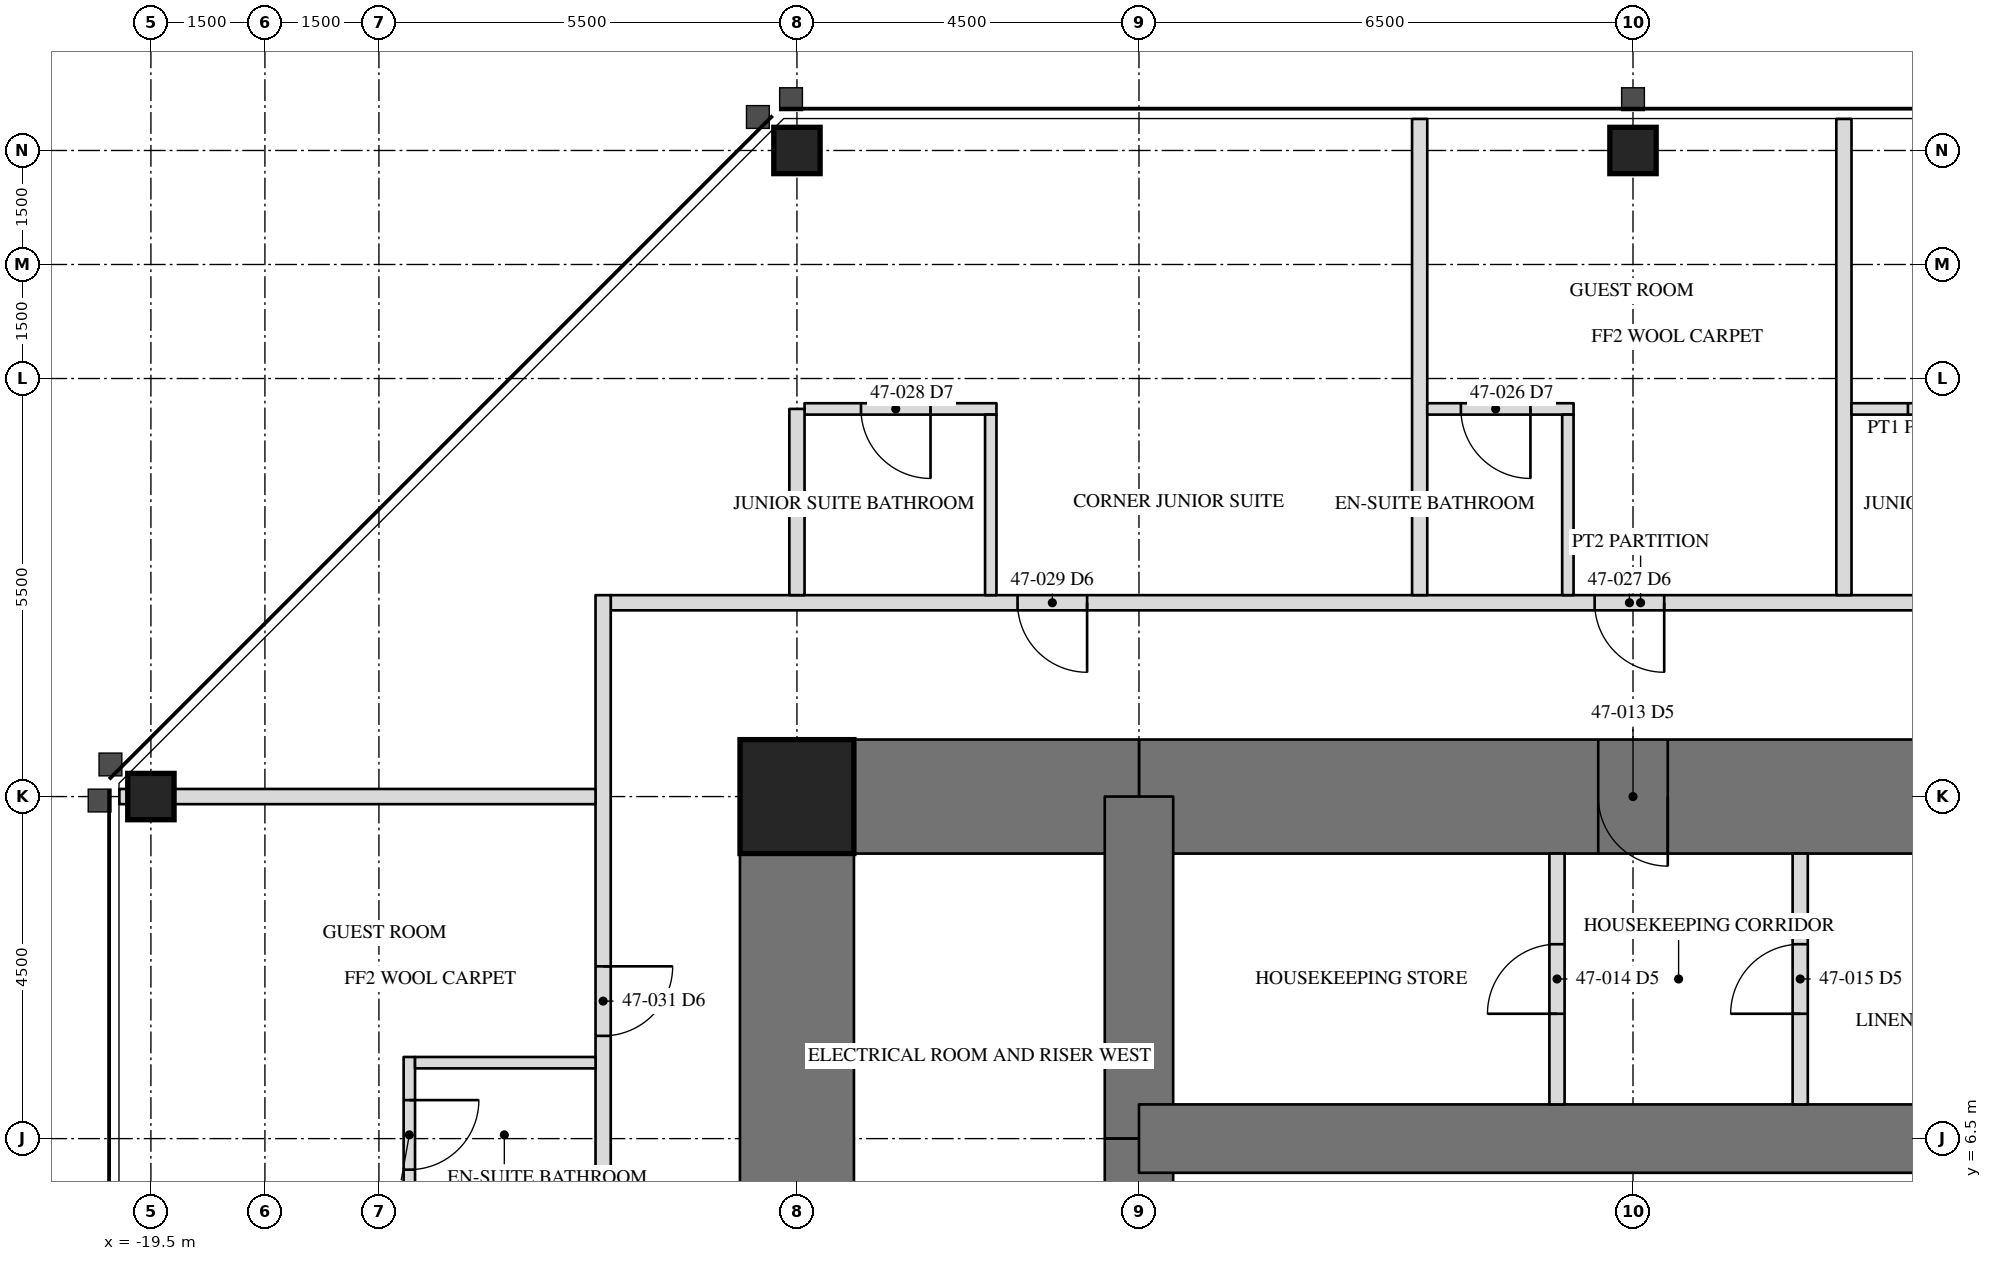
"""IFC4 building model, lengths in metres.
Left out: names, types, materials, properties, quantities, classifications, styles, units other than length and angle.
Written with IfcOpenShell. Run it as: python <this file> out.ifc"""

import sys

from ifc_helpers import new_model, si_unit, direction, frame, frame_2d, origin, origin_2d, place, context, subcontext, project, spatial, rectangle, hollow_rectangle, extrude, element, fill, save


model = new_model("IFC4")
c1 = context("Model", 3, precision=1e-05, world=origin(), true_north=direction((0.0, 1.0)))
c2 = subcontext(c1, "Body", "Model", "MODEL_VIEW")
j1 = project(units=[si_unit("LENGTHUNIT", "METRE"), si_unit("PLANEANGLEUNIT", "RADIAN")], contexts=[c1])
p1 = place(None, origin())
s1 = spatial("IfcSite", under=j1, at=p1, CompositionType="ELEMENT")
p2 = place(p1, origin())
s2 = spatial("IfcBuilding", under=s1, at=p2, CompositionType="ELEMENT")
p3 = place(p2, frame((0.0, 0.0, 201.2)))
s3 = spatial("IfcBuildingStorey", under=s2, at=p3, CompositionType="ELEMENT", Elevation=201.2)
for number, where, z_axis, x_axis in (
    (1, (0.0, 19.5, 0.0), (0.0, 0.0, 1.0), (1.0, 0.0, 0.0)),
    (2, (-11.0, 19.5, 0.0), (0.0, 0.0, 1.0), (1.0, 0.0, 0.0)),
    (3, (-19.5, 11.0, 0.0), (0.0, 0.0, 1.0), (0.0, 1.0, 0.0)),
):
    element("IfcColumn", number, at=place(p3, frame(where, z_axis=z_axis, x_axis=x_axis)), inside=s3, PredefinedType="COLUMN", context=c2, shape_type="SweptSolid", body=[
        extrude(hollow_rectangle(XDim=0.61, YDim=0.61, WallThickness=0.076, at=origin_2d()), origin(), (0.0, 0.0, 1.0), 3.5),
    ])
p4 = place(p3, frame((-11.0, 11.0, 0.0), z_axis=(0.0, 0.0, 1.0), x_axis=(0.0, -1.0, 0.0)))
e4 = element("IfcWall", 4, at=p4, inside=s3, PredefinedType="SHEAR", context=c2, shape_type="SweptSolid", body=[
    extrude(rectangle(XDim=22.0, YDim=1.5, at=frame_2d((11.0, 0.0))), origin(), (0.0, 0.0, 1.0), 3.5),
])
p5 = place(p4, frame((15.393, 0.0, 0.0)))
e5 = element("IfcOpeningElement", 5, at=p5, cuts=e4, PredefinedType="OPENING", context=c2, shape_type="SweptSolid", body=[
    extrude(rectangle(XDim=0.915, YDim=2.134, at=frame_2d((0.458, 1.067))), frame((0.0, 0.76, 0.0), z_axis=(0.0, -1.0, 0.0), x_axis=(1.0, 0.0, 0.0)), (0.0, 0.0, 1.0), 1.52),
])
p6 = place(p3, frame((6.5, 11.0, 0.0), z_axis=(0.0, 0.0, 1.0), x_axis=(-1.0, 0.0, 0.0)))
e6 = element("IfcWall", 6, at=p6, inside=s3, PredefinedType="SHEAR", context=c2, shape_type="SweptSolid", body=[
    extrude(rectangle(XDim=13.0, YDim=1.5, at=frame_2d((6.5, 0.0))), origin(), (0.0, 0.0, 1.0), 3.5),
])
p7 = place(p6, frame((6.042, 0.0, 0.0)))
e7 = element("IfcOpeningElement", 7, at=p7, cuts=e6, PredefinedType="OPENING", context=c2, shape_type="SweptSolid", body=[
    extrude(rectangle(XDim=0.915, YDim=2.134, at=frame_2d((0.458, 1.067))), frame((0.0, 0.76, 0.0), z_axis=(0.0, -1.0, 0.0), x_axis=(1.0, 0.0, 0.0)), (0.0, 0.0, 1.0), 1.52),
])
p8 = place(p3, frame((-6.5, 11.0, 0.0), z_axis=(0.0, 0.0, 1.0), x_axis=(-1.0, 0.0, 0.0)))
e8 = element("IfcWall", 8, at=p8, inside=s3, PredefinedType="SHEAR", context=c2, shape_type="SweptSolid", body=[
    extrude(rectangle(XDim=4.5, YDim=1.5, at=frame_2d((2.25, 0.0))), origin(), (0.0, 0.0, 1.0), 3.5),
])
p9 = place(p3, frame((-6.5, 11.0, 0.0), z_axis=(0.0, 0.0, 1.0), x_axis=(0.0, -1.0, 0.0)))
e9 = element("IfcWall", 9, at=p9, inside=s3, PredefinedType="SHEAR", context=c2, shape_type="SweptSolid", body=[
    extrude(rectangle(XDim=4.5, YDim=0.9, at=frame_2d((2.25, 0.0))), origin(), (0.0, 0.0, 1.0), 3.5),
])
p10 = place(p3, frame((-6.5, 6.5, 0.0), z_axis=(0.0, 0.0, 1.0), x_axis=(0.0, -1.0, 0.0)))
e10 = element("IfcWall", 10, at=p10, inside=s3, PredefinedType="SHEAR", context=c2, shape_type="SweptSolid", body=[
    extrude(rectangle(XDim=13.0, YDim=0.9, at=frame_2d((6.5, 0.0))), origin(), (0.0, 0.0, 1.0), 3.5),
])
p11 = place(p10, frame((10.893, 0.0, 0.0)))
e11 = element("IfcOpeningElement", 11, at=p11, cuts=e10, PredefinedType="OPENING", context=c2, shape_type="SweptSolid", body=[
    extrude(rectangle(XDim=0.915, YDim=2.134, at=frame_2d((0.458, 1.067))), frame((0.0, 0.46, 0.0), z_axis=(0.0, -1.0, 0.0), x_axis=(1.0, 0.0, 0.0)), (0.0, 0.0, 1.0), 0.92),
])
p12 = place(p10, frame((0.61, 0.0, 0.0)))
e12 = element("IfcOpeningElement", 12, at=p12, cuts=e10, PredefinedType="OPENING", context=c2, shape_type="SweptSolid", body=[
    extrude(rectangle(XDim=0.915, YDim=2.134, at=frame_2d((0.458, 1.067))), frame((0.0, 0.46, 0.0), z_axis=(0.0, -1.0, 0.0), x_axis=(1.0, 0.0, 0.0)), (0.0, 0.0, 1.0), 0.92),
])
p13 = place(p3, frame((6.5, 6.5, 0.0), z_axis=(0.0, 0.0, 1.0), x_axis=(-1.0, 0.0, 0.0)))
e13 = element("IfcWall", 13, at=p13, inside=s3, PredefinedType="SHEAR", context=c2, shape_type="SweptSolid", body=[
    extrude(rectangle(XDim=13.0, YDim=0.9, at=frame_2d((6.5, 0.0))), origin(), (0.0, 0.0, 1.0), 3.5),
])
p14 = place(p3, frame((-11.0, 11.0, 0.0), z_axis=(0.0, 0.0, 1.0), x_axis=(1.0, 0.0, 0.0)))
e14 = element("IfcColumn", 14, at=p14, inside=s3, PredefinedType="COLUMN", context=c2, shape_type="SweptSolid", body=[
    extrude(hollow_rectangle(XDim=1.499, YDim=1.499, WallThickness=0.102, at=origin_2d()), origin(), (0.0, 0.0, 1.0), 3.5),
])
p15 = place(p3, frame((-1.0, 6.95, 0.0), z_axis=(0.0, 0.0, 1.0), x_axis=(0.0, 1.0, 0.0)))
e15 = element("IfcWall", 15, at=p15, inside=s3, PredefinedType="PARTITIONING", context=c2, shape_type="SweptSolid", body=[
    extrude(rectangle(XDim=3.3, YDim=0.2, at=frame_2d((1.65, 0.0))), origin(), (0.0, 0.0, 1.0), 3.31),
])
p16 = place(p15, frame((1.192, 0.0, 0.0)))
e16 = element("IfcOpeningElement", 16, at=p16, cuts=e15, PredefinedType="OPENING", context=c2, shape_type="SweptSolid", body=[
    extrude(rectangle(XDim=0.915, YDim=2.134, at=frame_2d((0.458, 1.067))), frame((0.0, 0.11, 0.0), z_axis=(0.0, -1.0, 0.0), x_axis=(1.0, 0.0, 0.0)), (0.0, 0.0, 1.0), 0.22),
])
p17 = place(p3, frame((2.2, 6.95, 0.0), z_axis=(0.0, 0.0, 1.0), x_axis=(0.0, 1.0, 0.0)))
e17 = element("IfcWall", 17, at=p17, inside=s3, PredefinedType="PARTITIONING", context=c2, shape_type="SweptSolid", body=[
    extrude(rectangle(XDim=3.3, YDim=0.2, at=frame_2d((1.65, 0.0))), origin(), (0.0, 0.0, 1.0), 3.31),
])
p18 = place(p17, frame((1.192, 0.0, 0.0)))
e18 = element("IfcOpeningElement", 18, at=p18, cuts=e17, PredefinedType="OPENING", context=c2, shape_type="SweptSolid", body=[
    extrude(rectangle(XDim=0.915, YDim=2.134, at=frame_2d((0.458, 1.067))), frame((0.0, 0.11, 0.0), z_axis=(0.0, -1.0, 0.0), x_axis=(1.0, 0.0, 0.0)), (0.0, 0.0, 1.0), 0.22),
])
p19 = place(p3, frame((13.65, 13.55, 0.0), z_axis=(0.0, 0.0, 1.0), x_axis=(-1.0, 0.0, 0.0)))
e19 = element("IfcWall", 19, at=p19, inside=s3, PredefinedType="PARTITIONING", context=c2, shape_type="SweptSolid", body=[
    extrude(rectangle(XDim=27.1, YDim=0.2, at=frame_2d((13.55, 0.0))), origin(), (0.0, 0.0, 1.0), 3.31),
])
p20 = place(p19, frame((7.058, 0.0, 0.0)))
e20 = element("IfcOpeningElement", 20, at=p20, cuts=e19, PredefinedType="OPENING", context=c2, shape_type="SweptSolid", body=[
    extrude(rectangle(XDim=0.915, YDim=2.134, at=frame_2d((0.458, 1.067))), frame((0.0, 0.11, 0.0), z_axis=(0.0, -1.0, 0.0), x_axis=(1.0, 0.0, 0.0)), (0.0, 0.0, 1.0), 0.22),
])
p21 = place(p19, frame((13.24, 0.0, 0.0)))
e21 = element("IfcOpeningElement", 21, at=p21, cuts=e19, PredefinedType="OPENING", context=c2, shape_type="SweptSolid", body=[
    extrude(rectangle(XDim=0.915, YDim=2.134, at=frame_2d((0.458, 1.067))), frame((0.0, 0.11, 0.0), z_axis=(0.0, -1.0, 0.0), x_axis=(1.0, 0.0, 0.0)), (0.0, 0.0, 1.0), 0.22),
])
p22 = place(p19, frame((20.833, 0.0, 0.0)))
e22 = element("IfcOpeningElement", 22, at=p22, cuts=e19, PredefinedType="OPENING", context=c2, shape_type="SweptSolid", body=[
    extrude(rectangle(XDim=0.915, YDim=2.134, at=frame_2d((0.458, 1.067))), frame((0.0, 0.11, 0.0), z_axis=(0.0, -1.0, 0.0), x_axis=(1.0, 0.0, 0.0)), (0.0, 0.0, 1.0), 0.22),
])
p23 = place(p3, frame((-13.55, 13.65, 0.0), z_axis=(0.0, 0.0, 1.0), x_axis=(0.0, -1.0, 0.0)))
e23 = element("IfcWall", 23, at=p23, inside=s3, PredefinedType="PARTITIONING", context=c2, shape_type="SweptSolid", body=[
    extrude(rectangle(XDim=27.1, YDim=0.2, at=frame_2d((13.55, 0.0))), origin(), (0.0, 0.0, 1.0), 3.31),
])
p24 = place(p23, frame((4.884, 0.0, 0.0)))
e24 = element("IfcOpeningElement", 24, at=p24, cuts=e23, PredefinedType="OPENING", context=c2, shape_type="SweptSolid", body=[
    extrude(rectangle(XDim=0.915, YDim=2.134, at=frame_2d((0.458, 1.067))), frame((0.0, 0.11, 0.0), z_axis=(0.0, -1.0, 0.0), x_axis=(1.0, 0.0, 0.0)), (0.0, 0.0, 1.0), 0.22),
])
p25 = place(p23, frame((10.433, 0.0, 0.0)))
e25 = element("IfcOpeningElement", 25, at=p25, cuts=e23, PredefinedType="OPENING", context=c2, shape_type="SweptSolid", body=[
    extrude(rectangle(XDim=0.915, YDim=2.134, at=frame_2d((0.458, 1.067))), frame((0.0, 0.11, 0.0), z_axis=(0.0, -1.0, 0.0), x_axis=(1.0, 0.0, 0.0)), (0.0, 0.0, 1.0), 0.22),
])
p26 = place(p23, frame((16.046, 0.0, 0.0)))
e26 = element("IfcOpeningElement", 26, at=p26, cuts=e23, PredefinedType="OPENING", context=c2, shape_type="SweptSolid", body=[
    extrude(rectangle(XDim=0.915, YDim=2.134, at=frame_2d((0.458, 1.067))), frame((0.0, 0.11, 0.0), z_axis=(0.0, -1.0, 0.0), x_axis=(1.0, 0.0, 0.0)), (0.0, 0.0, 1.0), 0.22),
])
p27 = place(p23, frame((21.433, 0.0, 0.0)))
e27 = element("IfcOpeningElement", 27, at=p27, cuts=e23, PredefinedType="OPENING", context=c2, shape_type="SweptSolid", body=[
    extrude(rectangle(XDim=0.915, YDim=2.134, at=frame_2d((0.458, 1.067))), frame((0.0, 0.11, 0.0), z_axis=(0.0, -1.0, 0.0), x_axis=(1.0, 0.0, 0.0)), (0.0, 0.0, 1.0), 0.22),
])
for number, where, z_axis, x_axis in (
    (28, (2.775, 13.65, 0.0), (0.0, 0.0, 1.0), (0.0, 1.0, 0.0)),
    (29, (-2.807, 13.65, 0.0), (0.0, 0.0, 1.0), (0.0, 1.0, 0.0)),
):
    element("IfcWall", number, at=place(p3, frame(where, z_axis=z_axis, x_axis=x_axis)), inside=s3, PredefinedType="PARTITIONING", context=c2, shape_type="SweptSolid", body=[
        extrude(rectangle(XDim=6.265, YDim=0.2, at=frame_2d((3.133, 0.0))), origin(), (0.0, 0.0, 1.0), 3.31),
    ])
p28 = place(p3, frame((5.4, 16.1, 0.0), z_axis=(0.0, 0.0, 1.0), x_axis=(-1.0, 0.0, 0.0)))
e30 = element("IfcWall", 30, at=p28, inside=s3, PredefinedType="PARTITIONING", context=c2, shape_type="SweptSolid", body=[
    extrude(rectangle(XDim=2.525, YDim=0.15, at=frame_2d((1.262, 0.0))), origin(), (0.0, 0.0, 1.0), 3.31),
])
p29 = place(p28, frame((0.867, 0.0, 0.0)))
e31 = element("IfcOpeningElement", 31, at=p29, cuts=e30, PredefinedType="OPENING", context=c2, shape_type="SweptSolid", body=[
    extrude(rectangle(XDim=0.915, YDim=2.032, at=frame_2d((0.458, 1.016))), frame((0.0, 0.085, 0.0), z_axis=(0.0, -1.0, 0.0), x_axis=(1.0, 0.0, 0.0)), (0.0, 0.0, 1.0), 0.17),
])
p30 = place(p3, frame((-0.782, 16.1, 0.0), z_axis=(0.0, 0.0, 1.0), x_axis=(-1.0, 0.0, 0.0)))
e32 = element("IfcWall", 32, at=p30, inside=s3, PredefinedType="PARTITIONING", context=c2, shape_type="SweptSolid", body=[
    extrude(rectangle(XDim=1.925, YDim=0.15, at=frame_2d((0.962, 0.0))), origin(), (0.0, 0.0, 1.0), 3.31),
])
p31 = place(p30, frame((0.567, 0.0, 0.0)))
e33 = element("IfcOpeningElement", 33, at=p31, cuts=e32, PredefinedType="OPENING", context=c2, shape_type="SweptSolid", body=[
    extrude(rectangle(XDim=0.915, YDim=2.032, at=frame_2d((0.458, 1.016))), frame((0.0, 0.085, 0.0), z_axis=(0.0, -1.0, 0.0), x_axis=(1.0, 0.0, 0.0)), (0.0, 0.0, 1.0), 0.17),
])
p32 = place(p3, frame((-0.857, 13.65, 0.0), z_axis=(0.0, 0.0, 1.0), x_axis=(0.0, 1.0, 0.0)))
e34 = element("IfcWall", 34, at=p32, inside=s3, PredefinedType="PARTITIONING", context=c2, shape_type="SweptSolid", body=[
    extrude(rectangle(XDim=2.375, YDim=0.15, at=frame_2d((1.188, 0.0))), origin(), (0.0, 0.0, 1.0), 3.31),
])
p33 = place(p3, frame((-8.375, 16.1, 0.0), z_axis=(0.0, 0.0, 1.0), x_axis=(-1.0, 0.0, 0.0)))
e35 = element("IfcWall", 35, at=p33, inside=s3, PredefinedType="PARTITIONING", context=c2, shape_type="SweptSolid", body=[
    extrude(rectangle(XDim=2.525, YDim=0.15, at=frame_2d((1.262, 0.0))), origin(), (0.0, 0.0, 1.0), 3.31),
])
p34 = place(p33, frame((0.867, 0.0, 0.0)))
e36 = element("IfcOpeningElement", 36, at=p34, cuts=e35, PredefinedType="OPENING", context=c2, shape_type="SweptSolid", body=[
    extrude(rectangle(XDim=0.915, YDim=2.032, at=frame_2d((0.458, 1.016))), frame((0.0, 0.085, 0.0), z_axis=(0.0, -1.0, 0.0), x_axis=(1.0, 0.0, 0.0)), (0.0, 0.0, 1.0), 0.17),
])
p35 = place(p3, frame((-8.45, 13.65, 0.0), z_axis=(0.0, 0.0, 1.0), x_axis=(0.0, 1.0, 0.0)))
e37 = element("IfcWall", 37, at=p35, inside=s3, PredefinedType="PARTITIONING", context=c2, shape_type="SweptSolid", body=[
    extrude(rectangle(XDim=2.375, YDim=0.15, at=frame_2d((1.188, 0.0))), origin(), (0.0, 0.0, 1.0), 3.31),
])
p36 = place(p3, frame((-11.0, 13.65, 0.0), z_axis=(0.0, 0.0, 1.0), x_axis=(0.0, 1.0, 0.0)))
e38 = element("IfcWall", 38, at=p36, inside=s3, PredefinedType="PARTITIONING", context=c2, shape_type="SweptSolid", body=[
    extrude(rectangle(XDim=2.45, YDim=0.2, at=frame_2d((1.225, 0.0))), origin(), (0.0, 0.0, 1.0), 2.802),
])
p37 = place(p3, frame((-13.65, 11.0, 0.0), z_axis=(0.0, 0.0, 1.0), x_axis=(-1.0, 0.0, 0.0)))
e39 = element("IfcWall", 39, at=p37, inside=s3, PredefinedType="PARTITIONING", context=c2, shape_type="SweptSolid", body=[
    extrude(rectangle(XDim=6.265, YDim=0.2, at=frame_2d((3.133, 0.0))), origin(), (0.0, 0.0, 1.0), 2.802),
])
p38 = place(p3, frame((-16.1, 7.574, 0.0), z_axis=(0.0, 0.0, 1.0), x_axis=(0.0, -1.0, 0.0)))
e40 = element("IfcWall", 40, at=p38, inside=s3, PredefinedType="PARTITIONING", context=c2, shape_type="SweptSolid", body=[
    extrude(rectangle(XDim=1.925, YDim=0.15, at=frame_2d((0.962, 0.0))), origin(), (0.0, 0.0, 1.0), 3.31),
])
p39 = place(p38, frame((0.567, 0.0, 0.0)))
e41 = element("IfcOpeningElement", 41, at=p39, cuts=e40, PredefinedType="OPENING", context=c2, shape_type="SweptSolid", body=[
    extrude(rectangle(XDim=0.915, YDim=2.032, at=frame_2d((0.458, 1.016))), frame((0.0, 0.085, 0.0), z_axis=(0.0, -1.0, 0.0), x_axis=(1.0, 0.0, 0.0)), (0.0, 0.0, 1.0), 0.17),
])
p40 = place(p3, frame((-13.65, 7.499, 0.0), z_axis=(0.0, 0.0, 1.0), x_axis=(-1.0, 0.0, 0.0)))
e42 = element("IfcWall", 42, at=p40, inside=s3, PredefinedType="PARTITIONING", context=c2, shape_type="SweptSolid", body=[
    extrude(rectangle(XDim=2.375, YDim=0.15, at=frame_2d((1.188, 0.0))), origin(), (0.0, 0.0, 1.0), 3.31),
])
p41 = place(p7, origin())
e43 = element("IfcDoor", 43, at=p41, inside=s3, OperationType="SINGLE_SWING_RIGHT", PredefinedType="DOOR", context=c2, shape_type="SweptSolid", body=[
    extrude(rectangle(XDim=0.915, YDim=2.134, at=frame_2d((0.458, 1.067))), frame((0.0, 0.025, 0.0), z_axis=(0.0, -1.0, 0.0), x_axis=(1.0, 0.0, 0.0)), (0.0, 0.0, 1.0), 0.05),
])
fill(e7, e43)
p42 = place(p16, origin())
e44 = element("IfcDoor", 44, at=p42, inside=s3, OperationType="SINGLE_SWING_RIGHT", PredefinedType="DOOR", context=c2, shape_type="SweptSolid", body=[
    extrude(rectangle(XDim=0.915, YDim=2.134, at=frame_2d((0.458, 1.067))), frame((0.0, 0.025, 0.0), z_axis=(0.0, -1.0, 0.0), x_axis=(1.0, 0.0, 0.0)), (0.0, 0.0, 1.0), 0.05),
])
fill(e16, e44)
p43 = place(p18, origin())
e45 = element("IfcDoor", 45, at=p43, inside=s3, OperationType="SINGLE_SWING_RIGHT", PredefinedType="DOOR", context=c2, shape_type="SweptSolid", body=[
    extrude(rectangle(XDim=0.915, YDim=2.134, at=frame_2d((0.458, 1.067))), frame((0.0, 0.025, 0.0), z_axis=(0.0, -1.0, 0.0), x_axis=(1.0, 0.0, 0.0)), (0.0, 0.0, 1.0), 0.05),
])
fill(e18, e45)
p44 = place(p29, origin())
e46 = element("IfcDoor", 46, at=p44, inside=s3, OperationType="SINGLE_SWING_LEFT", PredefinedType="DOOR", context=c2, shape_type="SweptSolid", body=[
    extrude(rectangle(XDim=0.915, YDim=2.032, at=frame_2d((0.458, 1.016))), frame((0.0, 0.025, 0.0), z_axis=(0.0, -1.0, 0.0), x_axis=(1.0, 0.0, 0.0)), (0.0, 0.0, 1.0), 0.05),
])
fill(e31, e46)
p45 = place(p31, origin())
e47 = element("IfcDoor", 47, at=p45, inside=s3, OperationType="SINGLE_SWING_LEFT", PredefinedType="DOOR", context=c2, shape_type="SweptSolid", body=[
    extrude(rectangle(XDim=0.915, YDim=2.032, at=frame_2d((0.458, 1.016))), frame((0.0, 0.025, 0.0), z_axis=(0.0, -1.0, 0.0), x_axis=(1.0, 0.0, 0.0)), (0.0, 0.0, 1.0), 0.05),
])
fill(e33, e47)
p46 = place(p21, origin())
e48 = element("IfcDoor", 48, at=p46, inside=s3, OperationType="SINGLE_SWING_LEFT", PredefinedType="DOOR", context=c2, shape_type="SweptSolid", body=[
    extrude(rectangle(XDim=0.915, YDim=2.134, at=frame_2d((0.458, 1.067))), frame((0.0, 0.025, 0.0), z_axis=(0.0, -1.0, 0.0), x_axis=(1.0, 0.0, 0.0)), (0.0, 0.0, 1.0), 0.05),
])
fill(e21, e48)
p47 = place(p34, origin())
e49 = element("IfcDoor", 49, at=p47, inside=s3, OperationType="SINGLE_SWING_LEFT", PredefinedType="DOOR", context=c2, shape_type="SweptSolid", body=[
    extrude(rectangle(XDim=0.915, YDim=2.032, at=frame_2d((0.458, 1.016))), frame((0.0, 0.025, 0.0), z_axis=(0.0, -1.0, 0.0), x_axis=(1.0, 0.0, 0.0)), (0.0, 0.0, 1.0), 0.05),
])
fill(e36, e49)
p48 = place(p22, origin())
e50 = element("IfcDoor", 50, at=p48, inside=s3, OperationType="SINGLE_SWING_LEFT", PredefinedType="DOOR", context=c2, shape_type="SweptSolid", body=[
    extrude(rectangle(XDim=0.915, YDim=2.134, at=frame_2d((0.458, 1.067))), frame((0.0, 0.025, 0.0), z_axis=(0.0, -1.0, 0.0), x_axis=(1.0, 0.0, 0.0)), (0.0, 0.0, 1.0), 0.05),
])
fill(e22, e50)
p49 = place(p39, origin())
e51 = element("IfcDoor", 51, at=p49, inside=s3, OperationType="SINGLE_SWING_LEFT", PredefinedType="DOOR", context=c2, shape_type="SweptSolid", body=[
    extrude(rectangle(XDim=0.915, YDim=2.032, at=frame_2d((0.458, 1.016))), frame((0.0, 0.025, 0.0), z_axis=(0.0, -1.0, 0.0), x_axis=(1.0, 0.0, 0.0)), (0.0, 0.0, 1.0), 0.05),
])
fill(e41, e51)
p50 = place(p24, origin())
e52 = element("IfcDoor", 52, at=p50, inside=s3, OperationType="SINGLE_SWING_LEFT", PredefinedType="DOOR", context=c2, shape_type="SweptSolid", body=[
    extrude(rectangle(XDim=0.915, YDim=2.134, at=frame_2d((0.458, 1.067))), frame((0.0, 0.025, 0.0), z_axis=(0.0, -1.0, 0.0), x_axis=(1.0, 0.0, 0.0)), (0.0, 0.0, 1.0), 0.05),
])
fill(e24, e52)
save(model, sys.argv[1])
